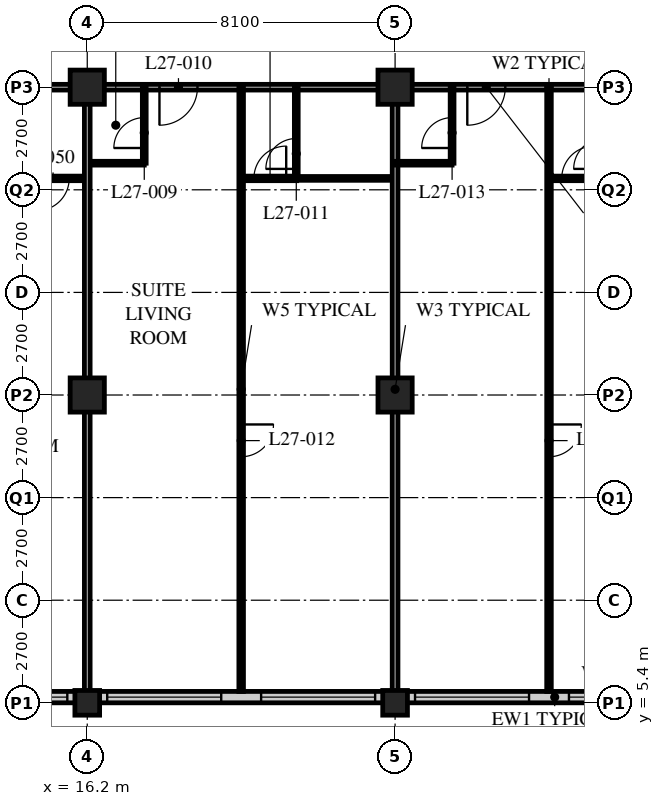
"""IFC4 building model, lengths in metres.
Left out: names, types, materials, properties, quantities, classifications, styles, units other than length and angle.
Written with IfcOpenShell. Run it as: python <this file> out.ifc"""

import sys

from ifc_helpers import new_model, si_unit, direction, frame, frame_2d, origin, origin_2d, place, context, subcontext, project, spatial, rectangle, hollow_rectangle, extrude, element, fill, save


model = new_model("IFC4")
c1 = context("Model", 3, precision=1e-05, world=origin(), true_north=direction((0.0, 1.0)))
c2 = subcontext(c1, "Body", "Model", "MODEL_VIEW")
j1 = project(units=[si_unit("LENGTHUNIT", "METRE"), si_unit("PLANEANGLEUNIT", "RADIAN")], contexts=[c1])
p1 = place(None, origin())
s1 = spatial("IfcSite", under=j1, at=p1, CompositionType="ELEMENT")
p2 = place(p1, origin())
s2 = spatial("IfcBuilding", under=s1, at=p2, CompositionType="ELEMENT")
p3 = place(p2, frame((0.0, 0.0, 110.2)))
s3 = spatial("IfcBuildingStorey", under=s2, at=p3, CompositionType="ELEMENT", Elevation=110.2)
p4 = place(p3, frame((16.2, 5.4, 0.0), z_axis=(0.0, 0.0, 1.0), x_axis=(1.0, 0.0, 0.0)))
e1 = element("IfcColumn", 1, at=p4, inside=s3, PredefinedType="COLUMN", context=c2, shape_type="SweptSolid", body=[
    extrude(hollow_rectangle(XDim=0.65, YDim=0.65, WallThickness=0.055, at=origin_2d()), origin(), (0.0, 0.0, 1.0), 3.4),
])
for number, where, z_axis, x_axis in (
    (2, (16.2, 13.5, 0.0), (0.0, 0.0, 1.0), (1.0, 0.0, 0.0)),
    (3, (16.2, 21.6, 0.0), (0.0, 0.0, 1.0), (1.0, 0.0, 0.0)),
):
    element("IfcColumn", number, at=place(p3, frame(where, z_axis=z_axis, x_axis=x_axis)), inside=s3, PredefinedType="COLUMN", context=c2, shape_type="SweptSolid", body=[
        extrude(hollow_rectangle(XDim=0.9, YDim=0.9, WallThickness=0.09, at=origin_2d()), origin(), (0.0, 0.0, 1.0), 3.4),
    ])
p5 = place(p3, frame((24.3, 5.4, 0.0), z_axis=(0.0, 0.0, 1.0), x_axis=(1.0, 0.0, 0.0)))
e4 = element("IfcColumn", 4, at=p5, inside=s3, PredefinedType="COLUMN", context=c2, shape_type="SweptSolid", body=[
    extrude(hollow_rectangle(XDim=0.65, YDim=0.65, WallThickness=0.055, at=origin_2d()), origin(), (0.0, 0.0, 1.0), 3.4),
])
for number, where, z_axis, x_axis in (
    (5, (24.3, 13.5, 0.0), (0.0, 0.0, 1.0), (1.0, 0.0, 0.0)),
    (6, (24.3, 21.6, 0.0), (0.0, 0.0, 1.0), (1.0, 0.0, 0.0)),
):
    element("IfcColumn", number, at=place(p3, frame(where, z_axis=z_axis, x_axis=x_axis)), inside=s3, PredefinedType="COLUMN", context=c2, shape_type="SweptSolid", body=[
        extrude(hollow_rectangle(XDim=0.9, YDim=0.9, WallThickness=0.09, at=origin_2d()), origin(), (0.0, 0.0, 1.0), 3.4),
    ])
p6 = place(p3, frame((8.4, 5.55, 0.0), z_axis=(0.0, 0.0, 1.0), x_axis=(1.0, 0.0, 0.0)))
e7 = element("IfcWall", 7, at=p6, inside=s3, PredefinedType="SOLIDWALL", context=c2, shape_type="SweptSolid", body=[
    extrude(rectangle(XDim=40.2, YDim=0.3, at=frame_2d((20.1, 0.0))), origin(), (0.0, 0.0, 1.0), 3.19),
])
p7 = place(p6, frame((0.225, 0.0, 0.9)))
e8 = element("IfcOpeningElement", 8, at=p7, cuts=e7, PredefinedType="OPENING", context=c2, shape_type="SweptSolid", body=[
    extrude(rectangle(XDim=3.0, YDim=2.0, at=frame_2d((1.5, 1.0))), frame((0.0, 0.16, 0.0), z_axis=(0.0, -1.0, 0.0), x_axis=(1.0, 0.0, 0.0)), (0.0, 0.0, 1.0), 0.32),
])
p8 = place(p6, frame((4.275, 0.0, 0.9)))
e9 = element("IfcOpeningElement", 9, at=p8, cuts=e7, PredefinedType="OPENING", context=c2, shape_type="SweptSolid", body=[
    extrude(rectangle(XDim=3.0, YDim=2.0, at=frame_2d((1.5, 1.0))), frame((0.0, 0.16, 0.0), z_axis=(0.0, -1.0, 0.0), x_axis=(1.0, 0.0, 0.0)), (0.0, 0.0, 1.0), 0.32),
])
p9 = place(p6, frame((8.325, 0.0, 0.9)))
e10 = element("IfcOpeningElement", 10, at=p9, cuts=e7, PredefinedType="OPENING", context=c2, shape_type="SweptSolid", body=[
    extrude(rectangle(XDim=3.0, YDim=2.0, at=frame_2d((1.5, 1.0))), frame((0.0, 0.16, 0.0), z_axis=(0.0, -1.0, 0.0), x_axis=(1.0, 0.0, 0.0)), (0.0, 0.0, 1.0), 0.32),
])
p10 = place(p6, frame((12.375, 0.0, 0.9)))
e11 = element("IfcOpeningElement", 11, at=p10, cuts=e7, PredefinedType="OPENING", context=c2, shape_type="SweptSolid", body=[
    extrude(rectangle(XDim=3.0, YDim=2.0, at=frame_2d((1.5, 1.0))), frame((0.0, 0.16, 0.0), z_axis=(0.0, -1.0, 0.0), x_axis=(1.0, 0.0, 0.0)), (0.0, 0.0, 1.0), 0.32),
])
p11 = place(p6, frame((16.425, 0.0, 0.9)))
e12 = element("IfcOpeningElement", 12, at=p11, cuts=e7, PredefinedType="OPENING", context=c2, shape_type="SweptSolid", body=[
    extrude(rectangle(XDim=3.0, YDim=2.0, at=frame_2d((1.5, 1.0))), frame((0.0, 0.16, 0.0), z_axis=(0.0, -1.0, 0.0), x_axis=(1.0, 0.0, 0.0)), (0.0, 0.0, 1.0), 0.32),
])
p12 = place(p6, frame((20.475, 0.0, 0.9)))
e13 = element("IfcOpeningElement", 13, at=p12, cuts=e7, PredefinedType="OPENING", context=c2, shape_type="SweptSolid", body=[
    extrude(rectangle(XDim=3.0, YDim=2.0, at=frame_2d((1.5, 1.0))), frame((0.0, 0.16, 0.0), z_axis=(0.0, -1.0, 0.0), x_axis=(1.0, 0.0, 0.0)), (0.0, 0.0, 1.0), 0.32),
])
p13 = place(p6, frame((24.525, 0.0, 0.9)))
e14 = element("IfcOpeningElement", 14, at=p13, cuts=e7, PredefinedType="OPENING", context=c2, shape_type="SweptSolid", body=[
    extrude(rectangle(XDim=3.0, YDim=2.0, at=frame_2d((1.5, 1.0))), frame((0.0, 0.16, 0.0), z_axis=(0.0, -1.0, 0.0), x_axis=(1.0, 0.0, 0.0)), (0.0, 0.0, 1.0), 0.32),
])
p14 = place(p6, frame((28.575, 0.0, 0.9)))
e15 = element("IfcOpeningElement", 15, at=p14, cuts=e7, PredefinedType="OPENING", context=c2, shape_type="SweptSolid", body=[
    extrude(rectangle(XDim=3.0, YDim=2.0, at=frame_2d((1.5, 1.0))), frame((0.0, 0.16, 0.0), z_axis=(0.0, -1.0, 0.0), x_axis=(1.0, 0.0, 0.0)), (0.0, 0.0, 1.0), 0.32),
])
p15 = place(p6, frame((32.625, 0.0, 0.9)))
e16 = element("IfcOpeningElement", 16, at=p15, cuts=e7, PredefinedType="OPENING", context=c2, shape_type="SweptSolid", body=[
    extrude(rectangle(XDim=3.0, YDim=2.0, at=frame_2d((1.5, 1.0))), frame((0.0, 0.16, 0.0), z_axis=(0.0, -1.0, 0.0), x_axis=(1.0, 0.0, 0.0)), (0.0, 0.0, 1.0), 0.32),
])
p16 = place(p6, frame((36.675, 0.0, 0.9)))
e17 = element("IfcOpeningElement", 17, at=p16, cuts=e7, PredefinedType="OPENING", context=c2, shape_type="SweptSolid", body=[
    extrude(rectangle(XDim=3.0, YDim=2.0, at=frame_2d((1.5, 1.0))), frame((0.0, 0.16, 0.0), z_axis=(0.0, -1.0, 0.0), x_axis=(1.0, 0.0, 0.0)), (0.0, 0.0, 1.0), 0.32),
])
p17 = place(p3, frame((12.15, 21.6, 0.0), z_axis=(0.0, 0.0, 1.0), x_axis=(1.0, 0.0, 0.0)))
e18 = element("IfcWall", 18, at=p17, inside=s3, PredefinedType="PARTITIONING", context=c2, shape_type="SweptSolid", body=[
    extrude(rectangle(XDim=32.4, YDim=0.15, at=frame_2d((16.2, 0.0))), origin(), (0.0, 0.0, 1.0), 2.578),
])
p18 = place(p17, frame((5.95, 0.0, 0.0)))
e19 = element("IfcOpeningElement", 19, at=p18, cuts=e18, PredefinedType="OPENING", context=c2, shape_type="SweptSolid", body=[
    extrude(rectangle(XDim=1.0, YDim=2.1, at=frame_2d((0.5, 1.05))), frame((0.0, 0.085, 0.0), z_axis=(0.0, -1.0, 0.0), x_axis=(1.0, 0.0, 0.0)), (0.0, 0.0, 1.0), 0.17),
])
p19 = place(p17, frame((14.05, 0.0, 0.0)))
e20 = element("IfcOpeningElement", 20, at=p19, cuts=e18, PredefinedType="OPENING", context=c2, shape_type="SweptSolid", body=[
    extrude(rectangle(XDim=1.0, YDim=2.1, at=frame_2d((0.5, 1.05))), frame((0.0, 0.085, 0.0), z_axis=(0.0, -1.0, 0.0), x_axis=(1.0, 0.0, 0.0)), (0.0, 0.0, 1.0), 0.17),
])
p20 = place(p17, frame((22.15, 0.0, 0.0)))
e21 = element("IfcOpeningElement", 21, at=p20, cuts=e18, PredefinedType="OPENING", context=c2, shape_type="SweptSolid", body=[
    extrude(rectangle(XDim=1.0, YDim=2.1, at=frame_2d((0.5, 1.05))), frame((0.0, 0.085, 0.0), z_axis=(0.0, -1.0, 0.0), x_axis=(1.0, 0.0, 0.0)), (0.0, 0.0, 1.0), 0.17),
])
p21 = place(p17, frame((1.525, 0.0, 0.0)))
e22 = element("IfcOpeningElement", 22, at=p21, cuts=e18, PredefinedType="OPENING", context=c2, shape_type="SweptSolid", body=[
    extrude(rectangle(XDim=1.0, YDim=2.1, at=frame_2d((0.5, 1.05))), frame((0.0, 0.085, 0.0), z_axis=(0.0, -1.0, 0.0), x_axis=(1.0, 0.0, 0.0)), (0.0, 0.0, 1.0), 0.17),
])
p22 = place(p17, frame((29.875, 0.0, 0.0)))
e23 = element("IfcOpeningElement", 23, at=p22, cuts=e18, PredefinedType="OPENING", context=c2, shape_type="SweptSolid", body=[
    extrude(rectangle(XDim=1.0, YDim=2.1, at=frame_2d((0.5, 1.05))), frame((0.0, 0.085, 0.0), z_axis=(0.0, -1.0, 0.0), x_axis=(1.0, 0.0, 0.0)), (0.0, 0.0, 1.0), 0.17),
])
p23 = place(p3, frame((16.2, 19.6, 0.0), z_axis=(0.0, 0.0, 1.0), x_axis=(1.0, 0.0, 0.0)))
e24 = element("IfcWall", 24, at=p23, inside=s3, PredefinedType="PARTITIONING", context=c2, shape_type="SweptSolid", body=[
    extrude(rectangle(XDim=1.5, YDim=0.1, at=frame_2d((0.75, 0.0))), origin(), (0.0, 0.0, 1.0), 3.19),
])
p24 = place(p3, frame((17.7, 21.6, 0.0), z_axis=(0.0, 0.0, 1.0), x_axis=(0.0, -1.0, 0.0)))
e25 = element("IfcWall", 25, at=p24, inside=s3, PredefinedType="PARTITIONING", context=c2, shape_type="SweptSolid", body=[
    extrude(rectangle(XDim=2.0, YDim=0.1, at=frame_2d((1.0, 0.0))), origin(), (0.0, 0.0, 1.0), 3.19),
])
p25 = place(p24, frame((0.8, 0.0, 0.0)))
e26 = element("IfcOpeningElement", 26, at=p25, cuts=e25, PredefinedType="OPENING", context=c2, shape_type="SweptSolid", body=[
    extrude(rectangle(XDim=0.8, YDim=2.1, at=frame_2d((0.4, 1.05))), frame((0.0, 0.06, 0.0), z_axis=(0.0, -1.0, 0.0), x_axis=(1.0, 0.0, 0.0)), (0.0, 0.0, 1.0), 0.12),
])
p26 = place(p3, frame((21.7, 19.2, 0.0), z_axis=(0.0, 0.0, 1.0), x_axis=(1.0, 0.0, 0.0)))
e27 = element("IfcWall", 27, at=p26, inside=s3, PredefinedType="PARTITIONING", context=c2, shape_type="SweptSolid", body=[
    extrude(rectangle(XDim=2.6, YDim=0.1, at=frame_2d((1.3, 0.0))), origin(), (0.0, 0.0, 1.0), 3.19),
])
p27 = place(p3, frame((21.7, 21.6, 0.0), z_axis=(0.0, 0.0, 1.0), x_axis=(0.0, -1.0, 0.0)))
e28 = element("IfcWall", 28, at=p27, inside=s3, PredefinedType="PARTITIONING", context=c2, shape_type="SweptSolid", body=[
    extrude(rectangle(XDim=2.4, YDim=0.1, at=frame_2d((1.2, 0.0))), origin(), (0.0, 0.0, 1.0), 3.19),
])
p28 = place(p27, frame((1.35, 0.0, 0.0)))
e29 = element("IfcOpeningElement", 29, at=p28, cuts=e28, PredefinedType="OPENING", context=c2, shape_type="SweptSolid", body=[
    extrude(rectangle(XDim=0.8, YDim=2.1, at=frame_2d((0.4, 1.05))), frame((0.0, 0.06, 0.0), z_axis=(0.0, -1.0, 0.0), x_axis=(1.0, 0.0, 0.0)), (0.0, 0.0, 1.0), 0.12),
])
p29 = place(p3, frame((20.25, 21.6, 0.0), z_axis=(0.0, 0.0, 1.0), x_axis=(0.0, -1.0, 0.0)))
e30 = element("IfcWall", 30, at=p29, inside=s3, PredefinedType="PARTITIONING", context=c2, shape_type="SweptSolid", body=[
    extrude(rectangle(XDim=15.9, YDim=0.12, at=frame_2d((7.95, 0.0))), origin(), (0.0, 0.0, 1.0), 3.19),
])
p30 = place(p29, frame((8.875, 0.0, 0.0)))
e31 = element("IfcOpeningElement", 31, at=p30, cuts=e30, PredefinedType="OPENING", context=c2, shape_type="SweptSolid", body=[
    extrude(rectangle(XDim=0.85, YDim=2.1, at=frame_2d((0.425, 1.05))), frame((0.0, 0.07, 0.0), z_axis=(0.0, -1.0, 0.0), x_axis=(1.0, 0.0, 0.0)), (0.0, 0.0, 1.0), 0.14),
])
p31 = place(p3, frame((24.3, 21.6, 0.0), z_axis=(0.0, 0.0, 1.0), x_axis=(0.0, -1.0, 0.0)))
e32 = element("IfcWall", 32, at=p31, inside=s3, PredefinedType="PARTITIONING", context=c2, shape_type="SweptSolid", body=[
    extrude(rectangle(XDim=15.9, YDim=0.15, at=frame_2d((7.95, 0.0))), origin(), (0.0, 0.0, 1.0), 2.578),
])
p32 = place(p3, frame((24.3, 19.6, 0.0), z_axis=(0.0, 0.0, 1.0), x_axis=(1.0, 0.0, 0.0)))
e33 = element("IfcWall", 33, at=p32, inside=s3, PredefinedType="PARTITIONING", context=c2, shape_type="SweptSolid", body=[
    extrude(rectangle(XDim=1.5, YDim=0.1, at=frame_2d((0.75, 0.0))), origin(), (0.0, 0.0, 1.0), 3.19),
])
p33 = place(p3, frame((25.8, 21.6, 0.0), z_axis=(0.0, 0.0, 1.0), x_axis=(0.0, -1.0, 0.0)))
e34 = element("IfcWall", 34, at=p33, inside=s3, PredefinedType="PARTITIONING", context=c2, shape_type="SweptSolid", body=[
    extrude(rectangle(XDim=2.0, YDim=0.1, at=frame_2d((1.0, 0.0))), origin(), (0.0, 0.0, 1.0), 3.19),
])
p34 = place(p33, frame((0.8, 0.0, 0.0)))
e35 = element("IfcOpeningElement", 35, at=p34, cuts=e34, PredefinedType="OPENING", context=c2, shape_type="SweptSolid", body=[
    extrude(rectangle(XDim=0.8, YDim=2.1, at=frame_2d((0.4, 1.05))), frame((0.0, 0.06, 0.0), z_axis=(0.0, -1.0, 0.0), x_axis=(1.0, 0.0, 0.0)), (0.0, 0.0, 1.0), 0.12),
])
p35 = place(p3, frame((28.35, 21.6, 0.0), z_axis=(0.0, 0.0, 1.0), x_axis=(0.0, -1.0, 0.0)))
e36 = element("IfcWall", 36, at=p35, inside=s3, PredefinedType="PARTITIONING", context=c2, shape_type="SweptSolid", body=[
    extrude(rectangle(XDim=15.9, YDim=0.12, at=frame_2d((7.95, 0.0))), origin(), (0.0, 0.0, 1.0), 3.19),
])
p36 = place(p35, frame((8.875, 0.0, 0.0)))
e37 = element("IfcOpeningElement", 37, at=p36, cuts=e36, PredefinedType="OPENING", context=c2, shape_type="SweptSolid", body=[
    extrude(rectangle(XDim=0.85, YDim=2.1, at=frame_2d((0.425, 1.05))), frame((0.0, 0.07, 0.0), z_axis=(0.0, -1.0, 0.0), x_axis=(1.0, 0.0, 0.0)), (0.0, 0.0, 1.0), 0.14),
])
p37 = place(p3, frame((8.15, 19.2, 0.0), z_axis=(0.0, 0.0, 1.0), x_axis=(1.0, 0.0, 0.0)))
e38 = element("IfcWall", 38, at=p37, inside=s3, PredefinedType="PARTITIONING", context=c2, shape_type="SweptSolid", body=[
    extrude(rectangle(XDim=8.05, YDim=0.12, at=frame_2d((4.025, 0.0))), origin(), (0.0, 0.0, 1.0), 3.19),
])
p38 = place(p37, frame((6.725, 0.0, 0.0)))
e39 = element("IfcOpeningElement", 39, at=p38, cuts=e38, PredefinedType="OPENING", context=c2, shape_type="SweptSolid", body=[
    extrude(rectangle(XDim=0.85, YDim=2.1, at=frame_2d((0.425, 1.05))), frame((0.0, 0.07, 0.0), z_axis=(0.0, -1.0, 0.0), x_axis=(1.0, 0.0, 0.0)), (0.0, 0.0, 1.0), 0.14),
])
p39 = place(p37, frame((2.875, 0.0, 0.0)))
e40 = element("IfcOpeningElement", 40, at=p39, cuts=e38, PredefinedType="OPENING", context=c2, shape_type="SweptSolid", body=[
    extrude(rectangle(XDim=0.85, YDim=2.1, at=frame_2d((0.425, 1.05))), frame((0.0, 0.07, 0.0), z_axis=(0.0, -1.0, 0.0), x_axis=(1.0, 0.0, 0.0)), (0.0, 0.0, 1.0), 0.14),
])
p40 = place(p3, frame((16.2, 21.6, 0.0), z_axis=(0.0, 0.0, 1.0), x_axis=(0.0, -1.0, 0.0)))
e41 = element("IfcWall", 41, at=p40, inside=s3, PredefinedType="PARTITIONING", context=c2, shape_type="SweptSolid", body=[
    extrude(rectangle(XDim=15.9, YDim=0.15, at=frame_2d((7.95, 0.0))), origin(), (0.0, 0.0, 1.0), 2.578),
])
p41 = place(p3, frame((21.71, 19.2, 0.0), z_axis=(0.0, 0.0, 1.0), x_axis=(-1.0, 0.0, 0.0)))
e42 = element("IfcWall", 42, at=p41, inside=s3, PredefinedType="PARTITIONING", context=c2, shape_type="SweptSolid", body=[
    extrude(rectangle(XDim=1.46, YDim=0.12, at=frame_2d((0.73, 0.0))), origin(), (0.0, 0.0, 1.0), 3.19),
])
p42 = place(p41, frame((0.275, 0.0, 0.0)))
e43 = element("IfcOpeningElement", 43, at=p42, cuts=e42, PredefinedType="OPENING", context=c2, shape_type="SweptSolid", body=[
    extrude(rectangle(XDim=0.85, YDim=2.1, at=frame_2d((0.425, 1.05))), frame((0.0, 0.07, 0.0), z_axis=(0.0, -1.0, 0.0), x_axis=(1.0, 0.0, 0.0)), (0.0, 0.0, 1.0), 0.14),
])
p43 = place(p3, frame((29.81, 19.2, 0.0), z_axis=(0.0, 0.0, 1.0), x_axis=(-1.0, 0.0, 0.0)))
e44 = element("IfcWall", 44, at=p43, inside=s3, PredefinedType="PARTITIONING", context=c2, shape_type="SweptSolid", body=[
    extrude(rectangle(XDim=1.46, YDim=0.12, at=frame_2d((0.73, 0.0))), origin(), (0.0, 0.0, 1.0), 3.19),
])
p44 = place(p43, frame((0.275, 0.0, 0.0)))
e45 = element("IfcOpeningElement", 45, at=p44, cuts=e44, PredefinedType="OPENING", context=c2, shape_type="SweptSolid", body=[
    extrude(rectangle(XDim=0.85, YDim=2.1, at=frame_2d((0.425, 1.05))), frame((0.0, 0.07, 0.0), z_axis=(0.0, -1.0, 0.0), x_axis=(1.0, 0.0, 0.0)), (0.0, 0.0, 1.0), 0.14),
])
p45 = place(p8, origin())
e46 = element("IfcWindow", 46, at=p45, inside=s3, PartitioningType="SINGLE_PANEL", PredefinedType="WINDOW", context=c2, shape_type="SweptSolid", body=[
    extrude(rectangle(XDim=3.0, YDim=2.0, at=frame_2d((1.5, 1.0))), frame((0.0, 0.03, 0.0), z_axis=(0.0, -1.0, 0.0), x_axis=(1.0, 0.0, 0.0)), (0.0, 0.0, 1.0), 0.06),
])
fill(e9, e46)
p46 = place(p9, origin())
e47 = element("IfcWindow", 47, at=p46, inside=s3, PartitioningType="SINGLE_PANEL", PredefinedType="WINDOW", context=c2, shape_type="SweptSolid", body=[
    extrude(rectangle(XDim=3.0, YDim=2.0, at=frame_2d((1.5, 1.0))), frame((0.0, 0.03, 0.0), z_axis=(0.0, -1.0, 0.0), x_axis=(1.0, 0.0, 0.0)), (0.0, 0.0, 1.0), 0.06),
])
fill(e10, e47)
p47 = place(p10, origin())
e48 = element("IfcWindow", 48, at=p47, inside=s3, PartitioningType="SINGLE_PANEL", PredefinedType="WINDOW", context=c2, shape_type="SweptSolid", body=[
    extrude(rectangle(XDim=3.0, YDim=2.0, at=frame_2d((1.5, 1.0))), frame((0.0, 0.03, 0.0), z_axis=(0.0, -1.0, 0.0), x_axis=(1.0, 0.0, 0.0)), (0.0, 0.0, 1.0), 0.06),
])
fill(e11, e48)
p48 = place(p11, origin())
e49 = element("IfcWindow", 49, at=p48, inside=s3, PartitioningType="SINGLE_PANEL", PredefinedType="WINDOW", context=c2, shape_type="SweptSolid", body=[
    extrude(rectangle(XDim=3.0, YDim=2.0, at=frame_2d((1.5, 1.0))), frame((0.0, 0.03, 0.0), z_axis=(0.0, -1.0, 0.0), x_axis=(1.0, 0.0, 0.0)), (0.0, 0.0, 1.0), 0.06),
])
fill(e12, e49)
p49 = place(p12, origin())
e50 = element("IfcWindow", 50, at=p49, inside=s3, PartitioningType="SINGLE_PANEL", PredefinedType="WINDOW", context=c2, shape_type="SweptSolid", body=[
    extrude(rectangle(XDim=3.0, YDim=2.0, at=frame_2d((1.5, 1.0))), frame((0.0, 0.03, 0.0), z_axis=(0.0, -1.0, 0.0), x_axis=(1.0, 0.0, 0.0)), (0.0, 0.0, 1.0), 0.06),
])
fill(e13, e50)
p50 = place(p25, origin())
e51 = element("IfcDoor", 51, at=p50, inside=s3, OperationType="SINGLE_SWING_LEFT", PredefinedType="DOOR", context=c2, shape_type="SweptSolid", body=[
    extrude(rectangle(XDim=0.8, YDim=2.1, at=frame_2d((0.4, 1.05))), frame((0.0, 0.025, 0.0), z_axis=(0.0, -1.0, 0.0), x_axis=(1.0, 0.0, 0.0)), (0.0, 0.0, 1.0), 0.05),
])
fill(e26, e51)
p51 = place(p18, origin())
e52 = element("IfcDoor", 52, at=p51, inside=s3, OperationType="SINGLE_SWING_RIGHT", PredefinedType="DOOR", context=c2, shape_type="SweptSolid", body=[
    extrude(rectangle(XDim=1.0, YDim=2.1, at=frame_2d((0.5, 1.05))), frame((0.0, 0.025, 0.0), z_axis=(0.0, -1.0, 0.0), x_axis=(1.0, 0.0, 0.0)), (0.0, 0.0, 1.0), 0.05),
])
fill(e19, e52)
p52 = place(p28, origin())
e53 = element("IfcDoor", 53, at=p52, inside=s3, OperationType="SINGLE_SWING_LEFT", PredefinedType="DOOR", context=c2, shape_type="SweptSolid", body=[
    extrude(rectangle(XDim=0.8, YDim=2.1, at=frame_2d((0.4, 1.05))), frame((0.0, 0.025, 0.0), z_axis=(0.0, -1.0, 0.0), x_axis=(1.0, 0.0, 0.0)), (0.0, 0.0, 1.0), 0.05),
])
fill(e29, e53)
p53 = place(p30, origin())
e54 = element("IfcDoor", 54, at=p53, inside=s3, OperationType="SINGLE_SWING_LEFT", PredefinedType="DOOR", context=c2, shape_type="SweptSolid", body=[
    extrude(rectangle(XDim=0.85, YDim=2.1, at=frame_2d((0.425, 1.05))), frame((0.0, 0.025, 0.0), z_axis=(0.0, -1.0, 0.0), x_axis=(1.0, 0.0, 0.0)), (0.0, 0.0, 1.0), 0.05),
])
fill(e31, e54)
p54 = place(p34, origin())
e55 = element("IfcDoor", 55, at=p54, inside=s3, OperationType="SINGLE_SWING_LEFT", PredefinedType="DOOR", context=c2, shape_type="SweptSolid", body=[
    extrude(rectangle(XDim=0.8, YDim=2.1, at=frame_2d((0.4, 1.05))), frame((0.0, 0.025, 0.0), z_axis=(0.0, -1.0, 0.0), x_axis=(1.0, 0.0, 0.0)), (0.0, 0.0, 1.0), 0.05),
])
fill(e35, e55)
p55 = place(p19, origin())
e56 = element("IfcDoor", 56, at=p55, inside=s3, OperationType="SINGLE_SWING_RIGHT", PredefinedType="DOOR", context=c2, shape_type="SweptSolid", body=[
    extrude(rectangle(XDim=1.0, YDim=2.1, at=frame_2d((0.5, 1.05))), frame((0.0, 0.025, 0.0), z_axis=(0.0, -1.0, 0.0), x_axis=(1.0, 0.0, 0.0)), (0.0, 0.0, 1.0), 0.05),
])
fill(e20, e56)
p56 = place(p36, origin())
e57 = element("IfcDoor", 57, at=p56, inside=s3, OperationType="SINGLE_SWING_LEFT", PredefinedType="DOOR", context=c2, shape_type="SweptSolid", body=[
    extrude(rectangle(XDim=0.85, YDim=2.1, at=frame_2d((0.425, 1.05))), frame((0.0, 0.025, 0.0), z_axis=(0.0, -1.0, 0.0), x_axis=(1.0, 0.0, 0.0)), (0.0, 0.0, 1.0), 0.05),
])
fill(e37, e57)
p57 = place(p38, origin())
e58 = element("IfcDoor", 58, at=p57, inside=s3, OperationType="SINGLE_SWING_RIGHT", PredefinedType="DOOR", context=c2, shape_type="SweptSolid", body=[
    extrude(rectangle(XDim=0.85, YDim=2.1, at=frame_2d((0.425, 1.05))), frame((0.0, 0.025, 0.0), z_axis=(0.0, -1.0, 0.0), x_axis=(1.0, 0.0, 0.0)), (0.0, 0.0, 1.0), 0.05),
])
fill(e39, e58)
p58 = place(p42, origin())
e59 = element("IfcDoor", 59, at=p58, inside=s3, OperationType="SINGLE_SWING_RIGHT", PredefinedType="DOOR", context=c2, shape_type="SweptSolid", body=[
    extrude(rectangle(XDim=0.85, YDim=2.1, at=frame_2d((0.425, 1.05))), frame((0.0, 0.025, 0.0), z_axis=(0.0, -1.0, 0.0), x_axis=(1.0, 0.0, 0.0)), (0.0, 0.0, 1.0), 0.05),
])
fill(e43, e59)
p59 = place(p44, origin())
e60 = element("IfcDoor", 60, at=p59, inside=s3, OperationType="SINGLE_SWING_RIGHT", PredefinedType="DOOR", context=c2, shape_type="SweptSolid", body=[
    extrude(rectangle(XDim=0.85, YDim=2.1, at=frame_2d((0.425, 1.05))), frame((0.0, 0.025, 0.0), z_axis=(0.0, -1.0, 0.0), x_axis=(1.0, 0.0, 0.0)), (0.0, 0.0, 1.0), 0.05),
])
fill(e45, e60)
save(model, sys.argv[1])
